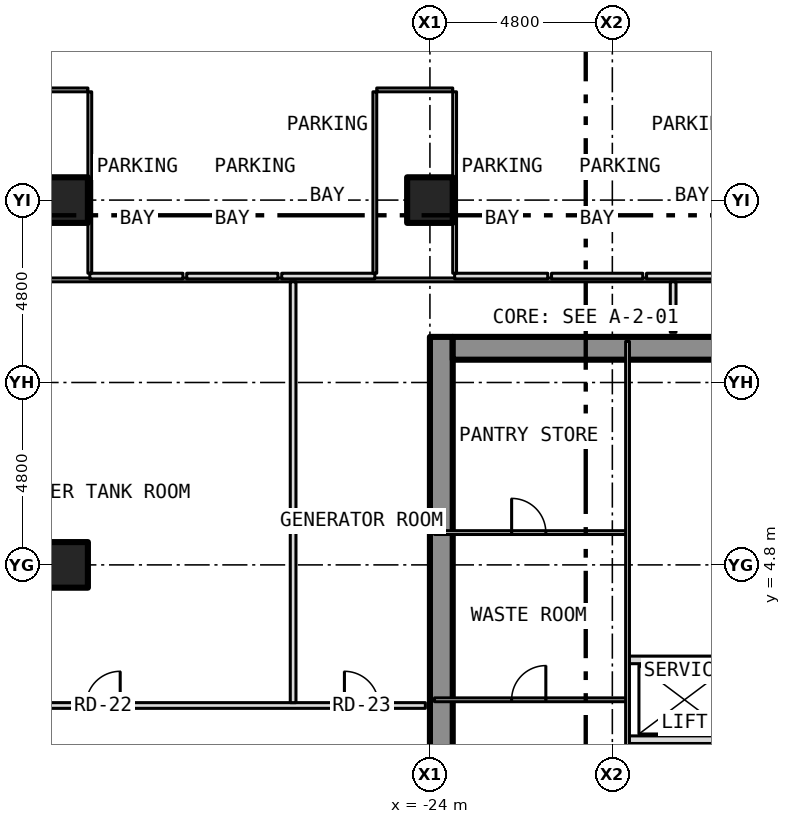
"""IFC4 building model, lengths in metres.
Left out: names, types, materials, properties, quantities, classifications, styles, units other than length and angle.
Written with IfcOpenShell. Run it as: python <this file> out.ifc"""

import sys

from ifc_helpers import new_model, si_unit, direction, frame, frame_2d, origin, origin_2d, place, context, subcontext, project, spatial, rectangle, hollow_rectangle, extrude, element, fill, save


model = new_model("IFC4")
c1 = context("Model", 3, precision=1e-05, world=origin(), true_north=direction((0.0, 1.0)))
c2 = subcontext(c1, "Body", "Model", "MODEL_VIEW")
j1 = project(units=[si_unit("LENGTHUNIT", "METRE"), si_unit("PLANEANGLEUNIT", "RADIAN")], contexts=[c1])
p1 = place(None, origin())
s1 = spatial("IfcSite", under=j1, at=p1, CompositionType="ELEMENT")
p2 = place(p1, origin())
s2 = spatial("IfcBuilding", under=s1, at=p2, CompositionType="ELEMENT")
p3 = place(p2, frame((0.0, 0.0, -10.0)))
s3 = spatial("IfcBuildingStorey", under=s2, at=p3, CompositionType="ELEMENT", Elevation=-10.0)
for number, where, z_axis, x_axis in (
    (1, (-33.6, 4.8, -0.6), (0.0, 0.0, 1.0), (1.0, 0.0, 0.0)),
    (2, (-33.6, 14.4, -0.6), (0.0, 0.0, 1.0), (1.0, 0.0, 0.0)),
    (3, (-24.0, 14.4, -0.6), (0.0, 0.0, 1.0), (1.0, 0.0, 0.0)),
):
    element("IfcColumn", number, at=place(p3, frame(where, z_axis=z_axis, x_axis=x_axis)), inside=s3, PredefinedType="COLUMN", context=c2, shape_type="SweptSolid", body=[
        extrude(hollow_rectangle(XDim=1.2, YDim=1.2, WallThickness=0.07, at=origin_2d()), origin(), (0.0, 0.0, 1.0), 5.3),
    ])
p4 = place(p3, frame((-23.7, -10.8, 0.0), z_axis=(0.0, 0.0, 1.0), x_axis=(0.0, 1.0, 0.0)))
e4 = element("IfcWall", 4, at=p4, inside=s3, PredefinedType="SHEAR", context=c2, shape_type="SweptSolid", body=[
    extrude(rectangle(XDim=21.6, YDim=0.6, at=frame_2d((10.8, 0.0))), origin(), (0.0, 0.0, 1.0), 4.7),
])
p5 = place(p3, frame((-23.4, 10.5, 0.0), z_axis=(0.0, 0.0, 1.0), x_axis=(1.0, 0.0, 0.0)))
e5 = element("IfcWall", 5, at=p5, inside=s3, PredefinedType="SHEAR", context=c2, shape_type="SweptSolid", body=[
    extrude(rectangle(XDim=7.0, YDim=0.6, at=frame_2d((3.5, 0.0))), origin(), (0.0, 0.0, 1.0), 4.7),
])
p6 = place(p3, frame((-18.8, 0.2, 0.0), z_axis=(0.0, 0.0, 1.0), x_axis=(1.0, 0.0, 0.0)))
e6 = element("IfcWall", 6, at=p6, inside=s3, PredefinedType="PARTITIONING", context=c2, shape_type="SweptSolid", body=[
    extrude(rectangle(XDim=2.88, YDim=0.2, at=frame_2d((1.44, 0.0))), origin(), (0.0, 0.0, 1.0), 4.7),
])
p7 = place(p3, frame((-37.6, 1.1, 0.0), z_axis=(0.0, 0.0, 1.0), x_axis=(1.0, 0.0, 0.0)))
e7 = element("IfcWall", 7, at=p7, inside=s3, PredefinedType="PARTITIONING", context=c2, shape_type="SweptSolid", body=[
    extrude(rectangle(XDim=13.48, YDim=0.15, at=frame_2d((6.74, 0.0))), origin(), (0.0, 0.0, 1.0), 4.7),
])
p8 = place(p7, frame((4.55, 0.0, 0.0)))
e8 = element("IfcOpeningElement", 8, at=p8, cuts=e7, PredefinedType="OPENING", context=c2, shape_type="SweptSolid", body=[
    extrude(rectangle(XDim=0.9, YDim=2.1, at=frame_2d((0.45, 1.05))), frame((0.0, 0.087, 0.0), z_axis=(0.0, -1.0, 0.0), x_axis=(1.0, 0.0, 0.0)), (0.0, 0.0, 1.0), 0.174),
])
p9 = place(p7, frame((11.35, 0.0, 0.0)))
e9 = element("IfcOpeningElement", 9, at=p9, cuts=e7, PredefinedType="OPENING", context=c2, shape_type="SweptSolid", body=[
    extrude(rectangle(XDim=0.9, YDim=2.1, at=frame_2d((0.45, 1.05))), frame((0.0, 0.087, 0.0), z_axis=(0.0, -1.0, 0.0), x_axis=(1.0, 0.0, 0.0)), (0.0, 0.0, 1.0), 0.174),
])
p10 = place(p3, frame((-23.88, 1.25, 0.0), z_axis=(0.0, 0.0, 1.0), x_axis=(1.0, 0.0, 0.0)))
e10 = element("IfcWall", 10, at=p10, inside=s3, PredefinedType="PARTITIONING", context=c2, shape_type="SweptSolid", body=[
    extrude(rectangle(XDim=5.08, YDim=0.1, at=frame_2d((2.54, 0.0))), origin(), (0.0, 0.0, 1.0), 4.7),
])
p11 = place(p10, frame((2.03, 0.0, 0.0)))
e11 = element("IfcOpeningElement", 11, at=p11, cuts=e10, PredefinedType="OPENING", context=c2, shape_type="SweptSolid", body=[
    extrude(rectangle(XDim=0.9, YDim=2.1, at=frame_2d((0.45, 1.05))), frame((0.0, 0.062, 0.0), z_axis=(0.0, -1.0, 0.0), x_axis=(1.0, 0.0, 0.0)), (0.0, 0.0, 1.0), 0.124),
])
p12 = place(p3, frame((-18.8, 2.3, 0.0), z_axis=(0.0, 0.0, 1.0), x_axis=(1.0, 0.0, 0.0)))
e12 = element("IfcWall", 12, at=p12, inside=s3, PredefinedType="PARTITIONING", context=c2, shape_type="SweptSolid", body=[
    extrude(rectangle(XDim=2.88, YDim=0.2, at=frame_2d((1.44, 0.0))), origin(), (0.0, 0.0, 1.0), 4.7),
])
p13 = place(p3, frame((-23.88, 5.65, 0.0), z_axis=(0.0, 0.0, 1.0), x_axis=(1.0, 0.0, 0.0)))
e13 = element("IfcWall", 13, at=p13, inside=s3, PredefinedType="PARTITIONING", context=c2, shape_type="SweptSolid", body=[
    extrude(rectangle(XDim=5.08, YDim=0.1, at=frame_2d((2.54, 0.0))), origin(), (0.0, 0.0, 1.0), 4.7),
])
p14 = place(p13, frame((2.03, 0.0, 0.0)))
e14 = element("IfcOpeningElement", 14, at=p14, cuts=e13, PredefinedType="OPENING", context=c2, shape_type="SweptSolid", body=[
    extrude(rectangle(XDim=0.9, YDim=2.1, at=frame_2d((0.45, 1.05))), frame((0.0, 0.062, 0.0), z_axis=(0.0, -1.0, 0.0), x_axis=(1.0, 0.0, 0.0)), (0.0, 0.0, 1.0), 0.124),
])
p15 = place(p3, frame((-37.6, 12.3, 0.0), z_axis=(0.0, 0.0, 1.0), x_axis=(1.0, 0.0, 0.0)))
e15 = element("IfcWall", 15, at=p15, inside=s3, PredefinedType="PARTITIONING", context=c2, shape_type="SweptSolid", body=[
    extrude(rectangle(XDim=70.0, YDim=0.1, at=frame_2d((35.0, 0.0))), origin(), (0.0, 0.0, 1.0), 4.7),
])
p16 = place(p3, frame((-32.95, 12.4, 0.0), z_axis=(0.0, 0.0, 1.0), x_axis=(1.0, 0.0, 0.0)))
e16 = element("IfcWall", 16, at=p16, inside=s3, PredefinedType="PARTITIONING", context=c2, shape_type="SweptSolid", body=[
    extrude(rectangle(XDim=2.45, YDim=0.15, at=frame_2d((1.225, 0.0))), origin(), (0.0, 0.0, 1.0), 4.7),
])
p17 = place(p3, frame((-30.4, 12.4, 0.0), z_axis=(0.0, 0.0, 1.0), x_axis=(1.0, 0.0, 0.0)))
e17 = element("IfcWall", 17, at=p17, inside=s3, PredefinedType="PARTITIONING", context=c2, shape_type="SweptSolid", body=[
    extrude(rectangle(XDim=2.4, YDim=0.15, at=frame_2d((1.2, 0.0))), origin(), (0.0, 0.0, 1.0), 4.7),
])
p18 = place(p3, frame((-27.9, 12.4, 0.0), z_axis=(0.0, 0.0, 1.0), x_axis=(1.0, 0.0, 0.0)))
e18 = element("IfcWall", 18, at=p18, inside=s3, PredefinedType="PARTITIONING", context=c2, shape_type="SweptSolid", body=[
    extrude(rectangle(XDim=2.45, YDim=0.15, at=frame_2d((1.225, 0.0))), origin(), (0.0, 0.0, 1.0), 4.7),
])
p19 = place(p3, frame((-23.35, 12.4, 0.0), z_axis=(0.0, 0.0, 1.0), x_axis=(1.0, 0.0, 0.0)))
e19 = element("IfcWall", 19, at=p19, inside=s3, PredefinedType="PARTITIONING", context=c2, shape_type="SweptSolid", body=[
    extrude(rectangle(XDim=2.45, YDim=0.15, at=frame_2d((1.225, 0.0))), origin(), (0.0, 0.0, 1.0), 4.7),
])
p20 = place(p3, frame((-20.8, 12.4, 0.0), z_axis=(0.0, 0.0, 1.0), x_axis=(1.0, 0.0, 0.0)))
e20 = element("IfcWall", 20, at=p20, inside=s3, PredefinedType="PARTITIONING", context=c2, shape_type="SweptSolid", body=[
    extrude(rectangle(XDim=2.4, YDim=0.15, at=frame_2d((1.2, 0.0))), origin(), (0.0, 0.0, 1.0), 4.7),
])
p21 = place(p3, frame((-18.3, 12.4, 0.0), z_axis=(0.0, 0.0, 1.0), x_axis=(1.0, 0.0, 0.0)))
e21 = element("IfcWall", 21, at=p21, inside=s3, PredefinedType="PARTITIONING", context=c2, shape_type="SweptSolid", body=[
    extrude(rectangle(XDim=2.45, YDim=0.15, at=frame_2d((1.225, 0.0))), origin(), (0.0, 0.0, 1.0), 4.7),
])
p22 = place(p3, frame((-35.05, 17.3, 0.0), z_axis=(0.0, 0.0, 1.0), x_axis=(1.0, 0.0, 0.0)))
e22 = element("IfcWall", 22, at=p22, inside=s3, PredefinedType="PARTITIONING", context=c2, shape_type="SweptSolid", body=[
    extrude(rectangle(XDim=2.05, YDim=0.1, at=frame_2d((1.025, 0.0))), origin(), (0.0, 0.0, 1.0), 4.7),
])
p23 = place(p3, frame((-25.4, 17.3, 0.0), z_axis=(0.0, 0.0, 1.0), x_axis=(1.0, 0.0, 0.0)))
e23 = element("IfcWall", 23, at=p23, inside=s3, PredefinedType="PARTITIONING", context=c2, shape_type="SweptSolid", body=[
    extrude(rectangle(XDim=2.0, YDim=0.1, at=frame_2d((1.0, 0.0))), origin(), (0.0, 0.0, 1.0), 4.7),
])
p24 = place(p3, frame((-32.95, 12.475, 0.0), z_axis=(0.0, 0.0, 1.0), x_axis=(0.0, 1.0, 0.0)))
e24 = element("IfcWall", 24, at=p24, inside=s3, PredefinedType="PARTITIONING", context=c2, shape_type="SweptSolid", body=[
    extrude(rectangle(XDim=4.775, YDim=0.1, at=frame_2d((2.387, 0.0))), origin(), (0.0, 0.0, 1.0), 4.7),
])
p25 = place(p3, frame((-27.6, 1.175, 0.0), z_axis=(0.0, 0.0, 1.0), x_axis=(0.0, 1.0, 0.0)))
e25 = element("IfcWall", 25, at=p25, inside=s3, PredefinedType="PARTITIONING", context=c2, shape_type="SweptSolid", body=[
    extrude(rectangle(XDim=11.075, YDim=0.15, at=frame_2d((5.538, 0.0))), origin(), (0.0, 0.0, 1.0), 4.7),
])
for number, where, z_axis, x_axis in (
    (26, (-25.45, 12.475, 0.0), (0.0, 0.0, 1.0), (0.0, 1.0, 0.0)),
    (27, (-23.35, 12.475, 0.0), (0.0, 0.0, 1.0), (0.0, 1.0, 0.0)),
):
    element("IfcWall", number, at=place(p3, frame(where, z_axis=z_axis, x_axis=x_axis)), inside=s3, PredefinedType="PARTITIONING", context=c2, shape_type="SweptSolid", body=[
        extrude(rectangle(XDim=4.775, YDim=0.1, at=frame_2d((2.387, 0.0))), origin(), (0.0, 0.0, 1.0), 4.7),
    ])
p26 = place(p3, frame((-18.8, -1.8, 0.0), z_axis=(0.0, 0.0, 1.0), x_axis=(0.0, 1.0, 0.0)))
e28 = element("IfcWall", 28, at=p26, inside=s3, PredefinedType="PARTITIONING", context=c2, shape_type="SweptSolid", body=[
    extrude(rectangle(XDim=12.48, YDim=0.1, at=frame_2d((6.24, 0.0))), origin(), (0.0, 0.0, 1.0), 4.7),
])
p27 = place(p3, frame((-17.6, 10.92, 0.0), z_axis=(0.0, 0.0, 1.0), x_axis=(0.0, 1.0, 0.0)))
e29 = element("IfcWall", 29, at=p27, inside=s3, PredefinedType="PARTITIONING", context=c2, shape_type="SweptSolid", body=[
    extrude(rectangle(XDim=1.33, YDim=0.15, at=frame_2d((0.665, 0.0))), origin(), (0.0, 0.0, 1.0), 4.7),
])
p28 = place(p11, origin())
e30 = element("IfcDoor", 30, at=p28, inside=s3, OperationType="SINGLE_SWING_RIGHT", PredefinedType="DOOR", context=c2, shape_type="SweptSolid", body=[
    extrude(rectangle(XDim=0.9, YDim=2.1, at=frame_2d((0.45, 1.05))), frame((0.0, 0.025, 0.0), z_axis=(0.0, -1.0, 0.0), x_axis=(1.0, 0.0, 0.0)), (0.0, 0.0, 1.0), 0.05),
])
fill(e11, e30)
p29 = place(p14, origin())
e31 = element("IfcDoor", 31, at=p29, inside=s3, OperationType="SINGLE_SWING_LEFT", PredefinedType="DOOR", context=c2, shape_type="SweptSolid", body=[
    extrude(rectangle(XDim=0.9, YDim=2.1, at=frame_2d((0.45, 1.05))), frame((0.0, 0.025, 0.0), z_axis=(0.0, -1.0, 0.0), x_axis=(1.0, 0.0, 0.0)), (0.0, 0.0, 1.0), 0.05),
])
fill(e14, e31)
p30 = place(p8, origin())
e32 = element("IfcDoor", 32, at=p30, inside=s3, OperationType="SINGLE_SWING_RIGHT", PredefinedType="DOOR", context=c2, shape_type="SweptSolid", body=[
    extrude(rectangle(XDim=0.9, YDim=2.1, at=frame_2d((0.45, 1.05))), frame((0.0, 0.025, 0.0), z_axis=(0.0, -1.0, 0.0), x_axis=(1.0, 0.0, 0.0)), (0.0, 0.0, 1.0), 0.05),
])
fill(e8, e32)
p31 = place(p9, origin())
e33 = element("IfcDoor", 33, at=p31, inside=s3, OperationType="SINGLE_SWING_LEFT", PredefinedType="DOOR", context=c2, shape_type="SweptSolid", body=[
    extrude(rectangle(XDim=0.9, YDim=2.1, at=frame_2d((0.45, 1.05))), frame((0.0, 0.025, 0.0), z_axis=(0.0, -1.0, 0.0), x_axis=(1.0, 0.0, 0.0)), (0.0, 0.0, 1.0), 0.05),
])
fill(e9, e33)
save(model, sys.argv[1])
